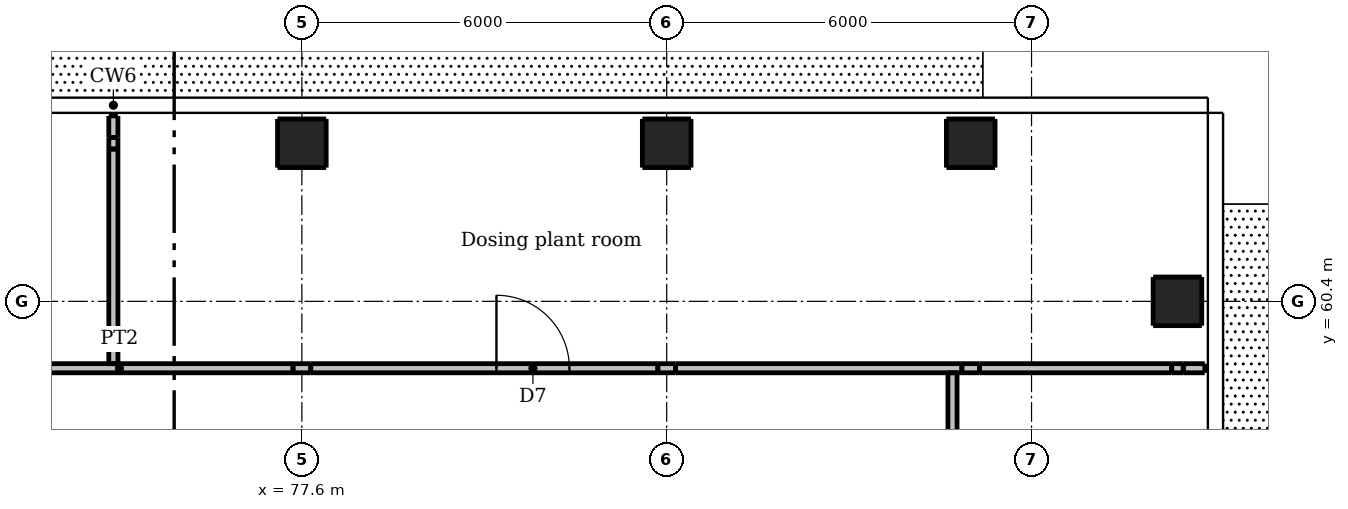
"""IFC4 building model, lengths in metres.
Left out: names, types, materials, properties, quantities, classifications, styles, units other than length and angle.
Written with IfcOpenShell. Run it as: python <this file> out.ifc"""

import sys

from ifc_helpers import new_model, si_unit, direction, frame, frame_2d, origin, origin_2d, place, context, subcontext, project, spatial, rectangle, extrude, element, fill, save


model = new_model("IFC4")
c1 = context("Model", 3, precision=1e-05, world=origin(), true_north=direction((0.0, 1.0)))
c2 = subcontext(c1, "Body", "Model", "MODEL_VIEW")
j1 = project(units=[si_unit("LENGTHUNIT", "METRE"), si_unit("PLANEANGLEUNIT", "RADIAN")], contexts=[c1])
p1 = place(None, origin())
s1 = spatial("IfcSite", under=j1, at=p1, CompositionType="ELEMENT")
p2 = place(p1, origin())
s2 = spatial("IfcBuilding", under=s1, at=p2, CompositionType="ELEMENT")
p3 = place(p2, frame((0.0, 0.0, 290.8)))
s3 = spatial("IfcBuildingStorey", under=s2, at=p3, CompositionType="ELEMENT", Elevation=290.8)
for number, where, z_axis, x_axis in (
    (1, (92.0, 60.4, 0.0), (0.0, 0.0, 1.0), (1.0, 0.0, 0.0)),
    (2, (77.6, 63.0, 0.0), (0.0, 0.0, 1.0), (1.0, 0.0, 0.0)),
    (3, (83.6, 63.0, 0.0), (0.0, 0.0, 1.0), (1.0, 0.0, 0.0)),
    (4, (88.6, 63.0, 0.0), (0.0, 0.0, 1.0), (1.0, 0.0, 0.0)),
):
    element("IfcColumn", number, at=place(p3, frame(where, z_axis=z_axis, x_axis=x_axis)), inside=s3, PredefinedType="COLUMN", context=c2, shape_type="SweptSolid", body=[
        extrude(rectangle(XDim=0.8, YDim=0.8, at=origin_2d()), origin(), (0.0, 0.0, 1.0), 3.3),
    ])
p4 = place(p3, frame((71.746, 59.3, 0.0), z_axis=(0.0, 0.0, 1.0), x_axis=(1.0, 0.0, 0.0)))
e5 = element("IfcWall", 5, at=p4, inside=s3, PredefinedType="PARTITIONING", context=c2, shape_type="SweptSolid", body=[
    extrude(rectangle(XDim=5.708, YDim=0.15, at=frame_2d((2.854, 0.0))), origin(), (0.0, 0.0, 1.0), 3.3),
])
p5 = place(p3, frame((77.454, 59.3, 0.0), z_axis=(0.0, 0.0, 1.0), x_axis=(1.0, 0.0, 0.0)))
e6 = element("IfcWall", 6, at=p5, inside=s3, PredefinedType="PARTITIONING", context=c2, shape_type="SweptSolid", body=[
    extrude(rectangle(XDim=0.292, YDim=0.15, at=frame_2d((0.146, 0.0))), origin(), (0.0, 0.0, 1.0), 2.465),
])
p6 = place(p3, frame((77.746, 59.3, 0.0), z_axis=(0.0, 0.0, 1.0), x_axis=(1.0, 0.0, 0.0)))
e7 = element("IfcWall", 7, at=p6, inside=s3, PredefinedType="PARTITIONING", context=c2, shape_type="SweptSolid", body=[
    extrude(rectangle(XDim=5.708, YDim=0.15, at=frame_2d((2.854, 0.0))), origin(), (0.0, 0.0, 1.0), 3.3),
])
p7 = place(p6, frame((3.054, 0.0, 0.0)))
e8 = element("IfcOpeningElement", 8, at=p7, cuts=e7, PredefinedType="OPENING", context=c2, shape_type="SweptSolid", body=[
    extrude(rectangle(XDim=1.2, YDim=2.1, at=frame_2d((0.6, 1.05))), frame((0.0, 0.085, 0.0), z_axis=(0.0, -1.0, 0.0), x_axis=(1.0, 0.0, 0.0)), (0.0, 0.0, 1.0), 0.17),
])
p8 = place(p3, frame((83.454, 59.3, 0.0), z_axis=(0.0, 0.0, 1.0), x_axis=(1.0, 0.0, 0.0)))
e9 = element("IfcWall", 9, at=p8, inside=s3, PredefinedType="PARTITIONING", context=c2, shape_type="SweptSolid", body=[
    extrude(rectangle(XDim=0.292, YDim=0.15, at=frame_2d((0.146, 0.0))), origin(), (0.0, 0.0, 1.0), 2.465),
])
p9 = place(p3, frame((83.746, 59.3, 0.0), z_axis=(0.0, 0.0, 1.0), x_axis=(1.0, 0.0, 0.0)))
e10 = element("IfcWall", 10, at=p9, inside=s3, PredefinedType="PARTITIONING", context=c2, shape_type="SweptSolid", body=[
    extrude(rectangle(XDim=4.708, YDim=0.15, at=frame_2d((2.354, 0.0))), origin(), (0.0, 0.0, 1.0), 3.3),
])
p10 = place(p3, frame((88.454, 59.3, 0.0), z_axis=(0.0, 0.0, 1.0), x_axis=(1.0, 0.0, 0.0)))
e11 = element("IfcWall", 11, at=p10, inside=s3, PredefinedType="PARTITIONING", context=c2, shape_type="SweptSolid", body=[
    extrude(rectangle(XDim=0.292, YDim=0.15, at=frame_2d((0.146, 0.0))), origin(), (0.0, 0.0, 1.0), 2.462),
])
p11 = place(p3, frame((88.746, 59.3, 0.0), z_axis=(0.0, 0.0, 1.0), x_axis=(1.0, 0.0, 0.0)))
e12 = element("IfcWall", 12, at=p11, inside=s3, PredefinedType="PARTITIONING", context=c2, shape_type="SweptSolid", body=[
    extrude(rectangle(XDim=3.159, YDim=0.15, at=frame_2d((1.58, 0.0))), origin(), (0.0, 0.0, 1.0), 3.3),
])
p12 = place(p3, frame((91.905, 59.3, 0.0), z_axis=(0.0, 0.0, 1.0), x_axis=(1.0, 0.0, 0.0)))
e13 = element("IfcWall", 13, at=p12, inside=s3, PredefinedType="PARTITIONING", context=c2, shape_type="SweptSolid", body=[
    extrude(rectangle(XDim=0.19, YDim=0.15, at=frame_2d((0.095, 0.0))), origin(), (0.0, 0.0, 1.0), 2.847),
])
p13 = place(p3, frame((92.095, 59.3, 0.0), z_axis=(0.0, 0.0, 1.0), x_axis=(1.0, 0.0, 0.0)))
e14 = element("IfcWall", 14, at=p13, inside=s3, PredefinedType="PARTITIONING", context=c2, shape_type="SweptSolid", body=[
    extrude(rectangle(XDim=0.355, YDim=0.15, at=frame_2d((0.177, 0.0))), origin(), (0.0, 0.0, 1.0), 3.3),
])
p14 = place(p3, frame((74.5, 59.375, 0.0), z_axis=(0.0, 0.0, 1.0), x_axis=(0.0, 1.0, 0.0)))
e15 = element("IfcWall", 15, at=p14, inside=s3, PredefinedType="PARTITIONING", context=c2, shape_type="SweptSolid", body=[
    extrude(rectangle(XDim=3.53, YDim=0.15, at=frame_2d((1.765, 0.0))), origin(), (0.0, 0.0, 1.0), 3.3),
])
p15 = place(p3, frame((74.5, 62.905, 0.0), z_axis=(0.0, 0.0, 1.0), x_axis=(0.0, 1.0, 0.0)))
e16 = element("IfcWall", 16, at=p15, inside=s3, PredefinedType="PARTITIONING", context=c2, shape_type="SweptSolid", body=[
    extrude(rectangle(XDim=0.19, YDim=0.15, at=frame_2d((0.095, 0.0))), origin(), (0.0, 0.0, 1.0), 2.847),
])
p16 = place(p3, frame((74.5, 63.095, 0.0), z_axis=(0.0, 0.0, 1.0), x_axis=(0.0, 1.0, 0.0)))
e17 = element("IfcWall", 17, at=p16, inside=s3, PredefinedType="PARTITIONING", context=c2, shape_type="SweptSolid", body=[
    extrude(rectangle(XDim=0.355, YDim=0.15, at=frame_2d((0.177, 0.0))), origin(), (0.0, 0.0, 1.0), 3.3),
])
p17 = place(p3, frame((88.3, 54.546, 0.0), z_axis=(0.0, 0.0, 1.0), x_axis=(0.0, 1.0, 0.0)))
e18 = element("IfcWall", 18, at=p17, inside=s3, PredefinedType="PARTITIONING", context=c2, shape_type="SweptSolid", body=[
    extrude(rectangle(XDim=4.679, YDim=0.15, at=frame_2d((2.34, 0.0))), origin(), (0.0, 0.0, 1.0), 3.3),
])
p18 = place(p7, origin())
e19 = element("IfcDoor", 19, at=p18, inside=s3, OperationType="SINGLE_SWING_LEFT", PredefinedType="DOOR", context=c2, shape_type="SweptSolid", body=[
    extrude(rectangle(XDim=1.2, YDim=2.1, at=frame_2d((0.6, 1.05))), frame((0.0, 0.025, 0.0), z_axis=(0.0, -1.0, 0.0), x_axis=(1.0, 0.0, 0.0)), (0.0, 0.0, 1.0), 0.05),
])
fill(e8, e19)
save(model, sys.argv[1])
